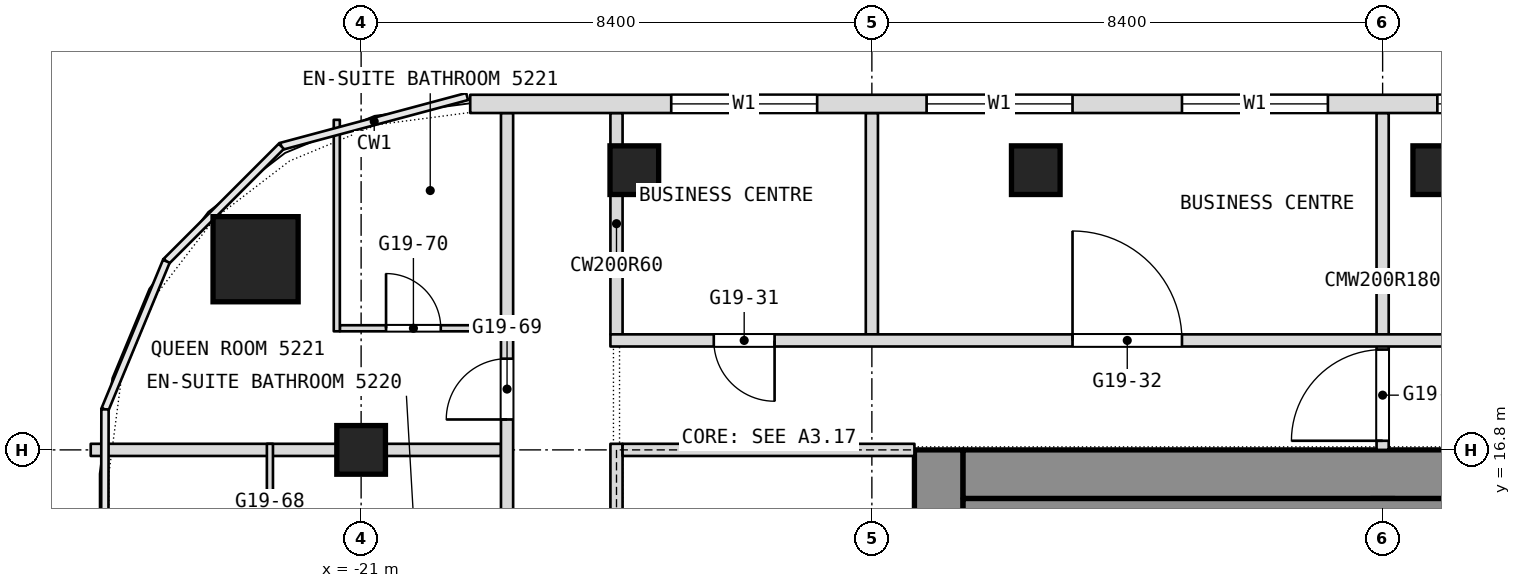
"""IFC4 building model, lengths in metres.
Left out: names, types, materials, properties, quantities, classifications, styles, units other than length and angle.
Written with IfcOpenShell. Run it as: python <this file> out.ifc"""

import sys

from ifc_helpers import new_model, si_unit, direction, frame, frame_2d, origin, origin_2d, place, context, subcontext, project, spatial, rectangle, extrude, element, fill, save


model = new_model("IFC4")
c1 = context("Model", 3, precision=1e-05, world=origin(), true_north=direction((0.0, 1.0)))
c2 = subcontext(c1, "Body", "Model", "MODEL_VIEW")
j1 = project(units=[si_unit("LENGTHUNIT", "METRE"), si_unit("PLANEANGLEUNIT", "RADIAN")], contexts=[c1])
p1 = place(None, origin())
s1 = spatial("IfcSite", under=j1, at=p1, CompositionType="ELEMENT")
p2 = place(p1, origin())
s2 = spatial("IfcBuilding", under=s1, at=p2, CompositionType="ELEMENT")
p3 = place(p2, frame((0.0, 0.0, 223.7)))
s3 = spatial("IfcBuildingStorey", under=s2, at=p3, CompositionType="ELEMENT", Elevation=223.7)
p4 = place(p3, frame((-11.5, 0.0, 0.0), z_axis=(0.0, 0.0, 1.0), x_axis=(0.0, 1.0, 0.0)))
e1 = element("IfcWall", 1, at=p4, inside=s3, PredefinedType="SHEAR", context=c2, shape_type="SweptSolid", body=[
    extrude(rectangle(XDim=16.8, YDim=0.8, at=frame_2d((8.4, 0.0))), origin(), (0.0, 0.0, 1.0), 3.6),
])
p5 = place(p4, frame((1.688, 0.0, 0.0)))
e2 = element("IfcOpeningElement", 2, at=p5, cuts=e1, PredefinedType="OPENING", context=c2, shape_type="SweptSolid", body=[
    extrude(rectangle(XDim=0.9, YDim=2.1, at=frame_2d((0.45, 1.05))), frame((0.0, 0.4, 0.0), z_axis=(0.0, -1.0, 0.0), x_axis=(1.0, 0.0, 0.0)), (0.0, 0.0, 1.0), 0.8),
])
p6 = place(p4, frame((4.312, 0.0, 0.0)))
e3 = element("IfcOpeningElement", 3, at=p6, cuts=e1, PredefinedType="OPENING", context=c2, shape_type="SweptSolid", body=[
    extrude(rectangle(XDim=0.9, YDim=2.1, at=frame_2d((0.45, 1.05))), frame((0.0, 0.4, 0.0), z_axis=(0.0, -1.0, 0.0), x_axis=(1.0, 0.0, 0.0)), (0.0, 0.0, 1.0), 0.8),
])
p7 = place(p4, frame((6.825, 0.0, 0.0)))
e4 = element("IfcOpeningElement", 4, at=p7, cuts=e1, PredefinedType="OPENING", context=c2, shape_type="SweptSolid", body=[
    extrude(rectangle(XDim=1.2, YDim=2.1, at=frame_2d((0.6, 1.05))), frame((0.0, 0.4, 0.0), z_axis=(0.0, -1.0, 0.0), x_axis=(1.0, 0.0, 0.0)), (0.0, 0.0, 1.0), 0.8),
])
p8 = place(p4, frame((12.3, 0.0, 0.0)))
e5 = element("IfcOpeningElement", 5, at=p8, cuts=e1, PredefinedType="OPENING", context=c2, shape_type="SweptSolid", body=[
    extrude(rectangle(XDim=0.9, YDim=2.1, at=frame_2d((0.45, 1.05))), frame((0.0, 0.4, 0.0), z_axis=(0.0, -1.0, 0.0), x_axis=(1.0, 0.0, 0.0)), (0.0, 0.0, 1.0), 0.8),
])
p9 = place(p4, frame((8.775, 0.0, 0.0)))
e6 = element("IfcOpeningElement", 6, at=p9, cuts=e1, PredefinedType="OPENING", context=c2, shape_type="SweptSolid", body=[
    extrude(rectangle(XDim=1.2, YDim=2.1, at=frame_2d((0.6, 1.05))), frame((0.0, 0.4, 0.0), z_axis=(0.0, -1.0, 0.0), x_axis=(1.0, 0.0, 0.0)), (0.0, 0.0, 1.0), 0.8),
])
p10 = place(p3, frame((-11.1, 16.4, 0.0), z_axis=(0.0, 0.0, 1.0), x_axis=(1.0, 0.0, 0.0)))
e7 = element("IfcWall", 7, at=p10, inside=s3, PredefinedType="SHEAR", context=c2, shape_type="SweptSolid", body=[
    extrude(rectangle(XDim=22.2, YDim=0.8, at=frame_2d((11.1, 0.0))), origin(), (0.0, 0.0, 1.0), 3.6),
])
p11 = place(p3, frame((-4.2, 0.8, 0.0), z_axis=(0.0, 0.0, 1.0), x_axis=(0.0, 1.0, 0.0)))
e8 = element("IfcWall", 8, at=p11, inside=s3, PredefinedType="SHEAR", context=c2, shape_type="SweptSolid", body=[
    extrude(rectangle(XDim=15.2, YDim=0.4, at=frame_2d((7.6, 0.0))), origin(), (0.0, 0.0, 1.0), 3.6),
])
p12 = place(p11, frame((8.5, 0.0, 0.0)))
e9 = element("IfcOpeningElement", 9, at=p12, cuts=e8, PredefinedType="OPENING", context=c2, shape_type="SweptSolid", body=[
    extrude(rectangle(XDim=1.2, YDim=2.1, at=frame_2d((0.6, 1.05))), frame((0.0, 0.2, 0.0), z_axis=(0.0, -1.0, 0.0), x_axis=(1.0, 0.0, 0.0)), (0.0, 0.0, 1.0), 0.4),
])
p13 = place(p3, frame((-22.736, 19.936, 0.0), z_axis=(0.0, 0.0, 1.0), x_axis=(1.0, 0.0, 0.0)))
e10 = element("IfcColumn", 10, at=p13, inside=s3, PredefinedType="COLUMN", context=c2, shape_type="SweptSolid", body=[
    extrude(rectangle(XDim=1.4, YDim=1.4, at=origin_2d()), origin(), (0.0, 0.0, 1.0), 3.6),
])
for number, where, z_axis, x_axis in (
    (11, (-21.0, 16.8, 0.0), (0.0, 0.0, 1.0), (1.0, 0.0, 0.0)),
    (12, (-16.507, 21.4, 0.0), (0.0, 0.0, 1.0), (1.0, 0.0, 0.0)),
    (13, (-9.904, 21.4, 0.0), (0.0, 0.0, 1.0), (1.0, 0.0, 0.0)),
    (14, (-3.302, 21.4, 0.0), (0.0, 0.0, 1.0), (1.0, 0.0, 0.0)),
):
    element("IfcColumn", number, at=place(p3, frame(where, z_axis=z_axis, x_axis=x_axis)), inside=s3, PredefinedType="COLUMN", context=c2, shape_type="SweptSolid", body=[
        extrude(rectangle(XDim=0.8, YDim=0.8, at=origin_2d()), origin(), (0.0, 0.0, 1.0), 3.6),
    ])
p14 = place(p3, frame((-4.2, 16.8, 0.0), z_axis=(0.0, 0.0, 1.0), x_axis=(0.0, 1.0, 0.0)))
e15 = element("IfcWall", 15, at=p14, inside=s3, PredefinedType="PARTITIONING", context=c2, shape_type="SweptSolid", body=[
    extrude(rectangle(XDim=5.54, YDim=0.2, at=frame_2d((2.77, 0.0))), origin(), (0.0, 0.0, 1.0), 3.34),
])
p15 = place(p14, frame((0.15, 0.0, 0.0)))
e16 = element("IfcOpeningElement", 16, at=p15, cuts=e15, PredefinedType="OPENING", context=c2, shape_type="SweptSolid", body=[
    extrude(rectangle(XDim=1.5, YDim=2.1, at=frame_2d((0.75, 1.05))), frame((0.0, 0.1, 0.0), z_axis=(0.0, -1.0, 0.0), x_axis=(1.0, 0.0, 0.0)), (0.0, 0.0, 1.0), 0.2),
])
for number, where, z_axis, x_axis in (
    (17, (-12.6, 18.7, 0.0), (0.0, 0.0, 1.0), (0.0, 1.0, 0.0)),
    (18, (-16.8, 18.7, 0.0), (0.0, 0.0, 1.0), (0.0, 1.0, 0.0)),
):
    element("IfcWall", number, at=place(p3, frame(where, z_axis=z_axis, x_axis=x_axis)), inside=s3, PredefinedType="PARTITIONING", context=c2, shape_type="SweptSolid", body=[
        extrude(rectangle(XDim=3.64, YDim=0.2, at=frame_2d((1.82, 0.0))), origin(), (0.0, 0.0, 1.0), 3.34),
    ])
p16 = place(p3, frame((-25.447, 16.8, 0.0), z_axis=(0.0, 0.0, 1.0), x_axis=(1.0, 0.0, 0.0)))
e19 = element("IfcWall", 19, at=p16, inside=s3, PredefinedType="PARTITIONING", context=c2, shape_type="SweptSolid", body=[
    extrude(rectangle(XDim=6.747, YDim=0.2, at=frame_2d((3.374, 0.0))), origin(), (0.0, 0.0, 1.0), 2.94),
])
p17 = place(p3, frame((-18.6, -26.751, 0.0), z_axis=(0.0, 0.0, 1.0), x_axis=(0.0, 1.0, 0.0)))
e20 = element("IfcWall", 20, at=p17, inside=s3, PredefinedType="PARTITIONING", context=c2, shape_type="SweptSolid", body=[
    extrude(rectangle(XDim=49.091, YDim=0.2, at=frame_2d((24.545, 0.0))), origin(), (0.0, 0.0, 1.0), 3.34),
])
p18 = place(p17, frame((3.413, 0.0, 0.0)))
e21 = element("IfcOpeningElement", 21, at=p18, cuts=e20, PredefinedType="OPENING", context=c2, shape_type="SweptSolid", body=[
    extrude(rectangle(XDim=1.0, YDim=2.1, at=frame_2d((0.5, 1.05))), frame((0.0, 0.1, 0.0), z_axis=(0.0, -1.0, 0.0), x_axis=(1.0, 0.0, 0.0)), (0.0, 0.0, 1.0), 0.2),
])
p19 = place(p17, frame((5.838, 0.0, 0.0)))
e22 = element("IfcOpeningElement", 22, at=p19, cuts=e20, PredefinedType="OPENING", context=c2, shape_type="SweptSolid", body=[
    extrude(rectangle(XDim=1.0, YDim=2.1, at=frame_2d((0.5, 1.05))), frame((0.0, 0.1, 0.0), z_axis=(0.0, -1.0, 0.0), x_axis=(1.0, 0.0, 0.0)), (0.0, 0.0, 1.0), 0.2),
])
p20 = place(p17, frame((10.351, 0.0, 0.0)))
e23 = element("IfcOpeningElement", 23, at=p20, cuts=e20, PredefinedType="OPENING", context=c2, shape_type="SweptSolid", body=[
    extrude(rectangle(XDim=1.0, YDim=2.1, at=frame_2d((0.5, 1.05))), frame((0.0, 0.1, 0.0), z_axis=(0.0, -1.0, 0.0), x_axis=(1.0, 0.0, 0.0)), (0.0, 0.0, 1.0), 0.2),
])
p21 = place(p17, frame((16.951, 0.0, 0.0)))
e24 = element("IfcOpeningElement", 24, at=p21, cuts=e20, PredefinedType="OPENING", context=c2, shape_type="SweptSolid", body=[
    extrude(rectangle(XDim=1.0, YDim=2.1, at=frame_2d((0.5, 1.05))), frame((0.0, 0.1, 0.0), z_axis=(0.0, -1.0, 0.0), x_axis=(1.0, 0.0, 0.0)), (0.0, 0.0, 1.0), 0.2),
])
p22 = place(p17, frame((21.151, 0.0, 0.0)))
e25 = element("IfcOpeningElement", 25, at=p22, cuts=e20, PredefinedType="OPENING", context=c2, shape_type="SweptSolid", body=[
    extrude(rectangle(XDim=1.0, YDim=2.1, at=frame_2d((0.5, 1.05))), frame((0.0, 0.1, 0.0), z_axis=(0.0, -1.0, 0.0), x_axis=(1.0, 0.0, 0.0)), (0.0, 0.0, 1.0), 0.2),
])
p23 = place(p17, frame((22.951, 0.0, 0.0)))
e26 = element("IfcOpeningElement", 26, at=p23, cuts=e20, PredefinedType="OPENING", context=c2, shape_type="SweptSolid", body=[
    extrude(rectangle(XDim=1.0, YDim=2.1, at=frame_2d((0.5, 1.05))), frame((0.0, 0.1, 0.0), z_axis=(0.0, -1.0, 0.0), x_axis=(1.0, 0.0, 0.0)), (0.0, 0.0, 1.0), 0.2),
])
p24 = place(p17, frame((30.351, 0.0, 0.0)))
e27 = element("IfcOpeningElement", 27, at=p24, cuts=e20, PredefinedType="OPENING", context=c2, shape_type="SweptSolid", body=[
    extrude(rectangle(XDim=1.1, YDim=2.1, at=frame_2d((0.55, 1.05))), frame((0.0, 0.1, 0.0), z_axis=(0.0, -1.0, 0.0), x_axis=(1.0, 0.0, 0.0)), (0.0, 0.0, 1.0), 0.2),
])
p25 = place(p17, frame((37.951, 0.0, 0.0)))
e28 = element("IfcOpeningElement", 28, at=p25, cuts=e20, PredefinedType="OPENING", context=c2, shape_type="SweptSolid", body=[
    extrude(rectangle(XDim=1.0, YDim=2.1, at=frame_2d((0.5, 1.05))), frame((0.0, 0.1, 0.0), z_axis=(0.0, -1.0, 0.0), x_axis=(1.0, 0.0, 0.0)), (0.0, 0.0, 1.0), 0.2),
])
p26 = place(p17, frame((39.751, 0.0, 0.0)))
e29 = element("IfcOpeningElement", 29, at=p26, cuts=e20, PredefinedType="OPENING", context=c2, shape_type="SweptSolid", body=[
    extrude(rectangle(XDim=1.0, YDim=2.1, at=frame_2d((0.5, 1.05))), frame((0.0, 0.1, 0.0), z_axis=(0.0, -1.0, 0.0), x_axis=(1.0, 0.0, 0.0)), (0.0, 0.0, 1.0), 0.2),
])
p27 = place(p17, frame((44.051, 0.0, 0.0)))
e30 = element("IfcOpeningElement", 30, at=p27, cuts=e20, PredefinedType="OPENING", context=c2, shape_type="SweptSolid", body=[
    extrude(rectangle(XDim=1.0, YDim=2.1, at=frame_2d((0.5, 1.05))), frame((0.0, 0.1, 0.0), z_axis=(0.0, -1.0, 0.0), x_axis=(1.0, 0.0, 0.0)), (0.0, 0.0, 1.0), 0.2),
])
p28 = place(p3, frame((-16.9, 18.6, 0.0), z_axis=(0.0, 0.0, 1.0), x_axis=(1.0, 0.0, 0.0)))
e31 = element("IfcWall", 31, at=p28, inside=s3, PredefinedType="PARTITIONING", context=c2, shape_type="SweptSolid", body=[
    extrude(rectangle(XDim=33.8, YDim=0.2, at=frame_2d((16.9, 0.0))), origin(), (0.0, 0.0, 1.0), 3.34),
])
p29 = place(p28, frame((1.7, 0.0, 0.0)))
e32 = element("IfcOpeningElement", 32, at=p29, cuts=e31, PredefinedType="OPENING", context=c2, shape_type="SweptSolid", body=[
    extrude(rectangle(XDim=1.0, YDim=2.1, at=frame_2d((0.5, 1.05))), frame((0.0, 0.1, 0.0), z_axis=(0.0, -1.0, 0.0), x_axis=(1.0, 0.0, 0.0)), (0.0, 0.0, 1.0), 0.2),
])
p30 = place(p28, frame((7.6, 0.0, 0.0)))
e33 = element("IfcOpeningElement", 33, at=p30, cuts=e31, PredefinedType="OPENING", context=c2, shape_type="SweptSolid", body=[
    extrude(rectangle(XDim=1.8, YDim=2.1, at=frame_2d((0.9, 1.05))), frame((0.0, 0.1, 0.0), z_axis=(0.0, -1.0, 0.0), x_axis=(1.0, 0.0, 0.0)), (0.0, 0.0, 1.0), 0.2),
])
p31 = place(p28, frame((16.0, 0.0, 0.0)))
e34 = element("IfcOpeningElement", 34, at=p31, cuts=e31, PredefinedType="OPENING", context=c2, shape_type="SweptSolid", body=[
    extrude(rectangle(XDim=1.8, YDim=2.1, at=frame_2d((0.9, 1.05))), frame((0.0, 0.1, 0.0), z_axis=(0.0, -1.0, 0.0), x_axis=(1.0, 0.0, 0.0)), (0.0, 0.0, 1.0), 0.2),
])
p32 = place(p28, frame((24.4, 0.0, 0.0)))
e35 = element("IfcOpeningElement", 35, at=p32, cuts=e31, PredefinedType="OPENING", context=c2, shape_type="SweptSolid", body=[
    extrude(rectangle(XDim=1.8, YDim=2.1, at=frame_2d((0.9, 1.05))), frame((0.0, 0.1, 0.0), z_axis=(0.0, -1.0, 0.0), x_axis=(1.0, 0.0, 0.0)), (0.0, 0.0, 1.0), 0.2),
])
p33 = place(p28, frame((31.1, 0.0, 0.0)))
e36 = element("IfcOpeningElement", 36, at=p33, cuts=e31, PredefinedType="OPENING", context=c2, shape_type="SweptSolid", body=[
    extrude(rectangle(XDim=1.0, YDim=2.1, at=frame_2d((0.5, 1.05))), frame((0.0, 0.1, 0.0), z_axis=(0.0, -1.0, 0.0), x_axis=(1.0, 0.0, 0.0)), (0.0, 0.0, 1.0), 0.2),
])
p34 = place(p3, frame((-21.35, 18.8, 0.0), z_axis=(0.0, 0.0, 1.0), x_axis=(1.0, 0.0, 0.0)))
e37 = element("IfcWall", 37, at=p34, inside=s3, PredefinedType="PARTITIONING", context=c2, shape_type="SweptSolid", body=[
    extrude(rectangle(XDim=2.65, YDim=0.1, at=frame_2d((1.325, 0.0))), origin(), (0.0, 0.0, 1.0), 3.34),
])
p35 = place(p34, frame((0.76, 0.0, 0.0)))
e38 = element("IfcOpeningElement", 38, at=p35, cuts=e37, PredefinedType="OPENING", context=c2, shape_type="SweptSolid", body=[
    extrude(rectangle(XDim=0.9, YDim=2.1, at=frame_2d((0.45, 1.05))), frame((0.0, 0.05, 0.0), z_axis=(0.0, -1.0, 0.0), x_axis=(1.0, 0.0, 0.0)), (0.0, 0.0, 1.0), 0.1),
])
p36 = place(p3, frame((-21.4, 18.75, 0.0), z_axis=(0.0, 0.0, 1.0), x_axis=(0.0, 1.0, 0.0)))
e39 = element("IfcWall", 39, at=p36, inside=s3, PredefinedType="PARTITIONING", context=c2, shape_type="SweptSolid", body=[
    extrude(rectangle(XDim=3.478, YDim=0.1, at=frame_2d((1.739, 0.0))), origin(), (0.0, 0.0, 1.0), 3.34),
])
p37 = place(p3, frame((-22.5, 14.35, 0.0), z_axis=(0.0, 0.0, 1.0), x_axis=(0.0, 1.0, 0.0)))
e40 = element("IfcWall", 40, at=p37, inside=s3, PredefinedType="PARTITIONING", context=c2, shape_type="SweptSolid", body=[
    extrude(rectangle(XDim=2.55, YDim=0.1, at=frame_2d((1.275, 0.0))), origin(), (0.0, 0.0, 1.0), 3.34),
])
p38 = place(p37, frame((0.15, 0.0, 0.0)))
e41 = element("IfcOpeningElement", 41, at=p38, cuts=e40, PredefinedType="OPENING", context=c2, shape_type="SweptSolid", body=[
    extrude(rectangle(XDim=0.9, YDim=2.1, at=frame_2d((0.45, 1.05))), frame((0.0, 0.05, 0.0), z_axis=(0.0, -1.0, 0.0), x_axis=(1.0, 0.0, 0.0)), (0.0, 0.0, 1.0), 0.1),
])
p39 = place(p3, frame((19.206, 22.49, 0.0), z_axis=(0.0, 0.0, 1.0), x_axis=(-1.0, 0.0, 0.0)))
e42 = element("IfcWall", 42, at=p39, inside=s3, PredefinedType="NOTDEFINED", context=c2, shape_type="SweptSolid", body=[
    extrude(rectangle(XDim=38.412, YDim=0.3, at=frame_2d((19.206, 0.0))), origin(), (0.0, 0.0, 1.0), 3.6),
])
p40 = place(p39, frame((3.306, 0.0, 0.9)))
e43 = element("IfcOpeningElement", 43, at=p40, cuts=e42, PredefinedType="OPENING", context=c2, shape_type="SweptSolid", body=[
    extrude(rectangle(XDim=2.4, YDim=2.1, at=frame_2d((1.2, 1.05))), frame((0.0, 0.15, 0.0), z_axis=(0.0, -1.0, 0.0), x_axis=(1.0, 0.0, 0.0)), (0.0, 0.0, 1.0), 0.3),
])
p41 = place(p39, frame((7.506, 0.0, 0.9)))
e44 = element("IfcOpeningElement", 44, at=p41, cuts=e42, PredefinedType="OPENING", context=c2, shape_type="SweptSolid", body=[
    extrude(rectangle(XDim=2.4, YDim=2.1, at=frame_2d((1.2, 1.05))), frame((0.0, 0.15, 0.0), z_axis=(0.0, -1.0, 0.0), x_axis=(1.0, 0.0, 0.0)), (0.0, 0.0, 1.0), 0.3),
])
p42 = place(p39, frame((11.706, 0.0, 0.9)))
e45 = element("IfcOpeningElement", 45, at=p42, cuts=e42, PredefinedType="OPENING", context=c2, shape_type="SweptSolid", body=[
    extrude(rectangle(XDim=2.4, YDim=2.1, at=frame_2d((1.2, 1.05))), frame((0.0, 0.15, 0.0), z_axis=(0.0, -1.0, 0.0), x_axis=(1.0, 0.0, 0.0)), (0.0, 0.0, 1.0), 0.3),
])
p43 = place(p39, frame((15.906, 0.0, 0.9)))
e46 = element("IfcOpeningElement", 46, at=p43, cuts=e42, PredefinedType="OPENING", context=c2, shape_type="SweptSolid", body=[
    extrude(rectangle(XDim=2.4, YDim=2.1, at=frame_2d((1.2, 1.05))), frame((0.0, 0.15, 0.0), z_axis=(0.0, -1.0, 0.0), x_axis=(1.0, 0.0, 0.0)), (0.0, 0.0, 1.0), 0.3),
])
p44 = place(p39, frame((20.106, 0.0, 0.9)))
e47 = element("IfcOpeningElement", 47, at=p44, cuts=e42, PredefinedType="OPENING", context=c2, shape_type="SweptSolid", body=[
    extrude(rectangle(XDim=2.4, YDim=2.1, at=frame_2d((1.2, 1.05))), frame((0.0, 0.15, 0.0), z_axis=(0.0, -1.0, 0.0), x_axis=(1.0, 0.0, 0.0)), (0.0, 0.0, 1.0), 0.3),
])
p45 = place(p39, frame((24.306, 0.0, 0.9)))
e48 = element("IfcOpeningElement", 48, at=p45, cuts=e42, PredefinedType="OPENING", context=c2, shape_type="SweptSolid", body=[
    extrude(rectangle(XDim=2.4, YDim=2.1, at=frame_2d((1.2, 1.05))), frame((0.0, 0.15, 0.0), z_axis=(0.0, -1.0, 0.0), x_axis=(1.0, 0.0, 0.0)), (0.0, 0.0, 1.0), 0.3),
])
p46 = place(p39, frame((28.506, 0.0, 0.9)))
e49 = element("IfcOpeningElement", 49, at=p46, cuts=e42, PredefinedType="OPENING", context=c2, shape_type="SweptSolid", body=[
    extrude(rectangle(XDim=2.4, YDim=2.1, at=frame_2d((1.2, 1.05))), frame((0.0, 0.15, 0.0), z_axis=(0.0, -1.0, 0.0), x_axis=(1.0, 0.0, 0.0)), (0.0, 0.0, 1.0), 0.3),
])
p47 = place(p39, frame((32.706, 0.0, 0.9)))
e50 = element("IfcOpeningElement", 50, at=p47, cuts=e42, PredefinedType="OPENING", context=c2, shape_type="SweptSolid", body=[
    extrude(rectangle(XDim=2.4, YDim=2.1, at=frame_2d((1.2, 1.05))), frame((0.0, 0.15, 0.0), z_axis=(0.0, -1.0, 0.0), x_axis=(1.0, 0.0, 0.0)), (0.0, 0.0, 1.0), 0.3),
])
p48 = place(p3, frame((-11.1, 15.65, 0.0), z_axis=(0.0, 0.0, 1.0), x_axis=(1.0, 0.0, 0.0)))
e51 = element("IfcWall", 51, at=p48, inside=s3, PredefinedType="PARTITIONING", context=c2, shape_type="SweptSolid", body=[
    extrude(rectangle(XDim=22.2, YDim=0.7, at=frame_2d((11.1, 0.0))), origin(), (0.0, 0.0, 1.0), 3.34),
])
p49 = place(p3, frame((-16.8, -0.1, 0.0), z_axis=(0.0, 0.0, 1.0), x_axis=(0.0, 1.0, 0.0)))
e52 = element("IfcWall", 52, at=p49, inside=s3, PredefinedType="PARTITIONING", context=c2, shape_type="SweptSolid", body=[
    extrude(rectangle(XDim=17.0, YDim=0.2, at=frame_2d((8.5, 0.0))), origin(), (0.0, 0.0, 1.0), 3.34),
])
p50 = place(p49, frame((2.2, 0.0, 0.0)))
e53 = element("IfcOpeningElement", 53, at=p50, cuts=e52, PredefinedType="OPENING", context=c2, shape_type="SweptSolid", body=[
    extrude(rectangle(XDim=1.8, YDim=2.1, at=frame_2d((0.9, 1.05))), frame((0.0, 0.1, 0.0), z_axis=(0.0, -1.0, 0.0), x_axis=(1.0, 0.0, 0.0)), (0.0, 0.0, 1.0), 0.2),
])
p51 = place(p49, frame((13.0, 0.0, 0.0)))
e54 = element("IfcOpeningElement", 54, at=p51, cuts=e52, PredefinedType="OPENING", context=c2, shape_type="SweptSolid", body=[
    extrude(rectangle(XDim=1.8, YDim=2.1, at=frame_2d((0.9, 1.05))), frame((0.0, 0.1, 0.0), z_axis=(0.0, -1.0, 0.0), x_axis=(1.0, 0.0, 0.0)), (0.0, 0.0, 1.0), 0.2),
])
p52 = place(p3, frame((-16.7, 16.8, 0.0), z_axis=(0.0, 0.0, 1.0), x_axis=(1.0, 0.0, 0.0)))
e55 = element("IfcWall", 55, at=p52, inside=s3, PredefinedType="PARTITIONING", context=c2, shape_type="SweptSolid", body=[
    extrude(rectangle(XDim=4.8, YDim=0.2, at=frame_2d((2.4, 0.0))), origin(), (0.0, 0.0, 1.0), 2.94),
])
p53 = place(p27, origin())
e56 = element("IfcDoor", 56, at=p53, inside=s3, OperationType="SINGLE_SWING_RIGHT", PredefinedType="DOOR", context=c2, shape_type="SweptSolid", body=[
    extrude(rectangle(XDim=1.0, YDim=2.1, at=frame_2d((0.5, 1.05))), frame((0.0, 0.025, 0.0), z_axis=(0.0, -1.0, 0.0), x_axis=(1.0, 0.0, 0.0)), (0.0, 0.0, 1.0), 0.05),
])
fill(e30, e56)
p54 = place(p29, origin())
e57 = element("IfcDoor", 57, at=p54, inside=s3, OperationType="SINGLE_SWING_LEFT", PredefinedType="DOOR", context=c2, shape_type="SweptSolid", body=[
    extrude(rectangle(XDim=1.0, YDim=2.1, at=frame_2d((0.5, 1.05))), frame((0.0, 0.025, 0.0), z_axis=(0.0, -1.0, 0.0), x_axis=(1.0, 0.0, 0.0)), (0.0, 0.0, 1.0), 0.05),
])
fill(e32, e57)
p55 = place(p30, origin())
e58 = element("IfcDoor", 58, at=p55, inside=s3, OperationType="DOUBLE_DOOR_SINGLE_SWING", PredefinedType="DOOR", context=c2, shape_type="SweptSolid", body=[
    extrude(rectangle(XDim=1.8, YDim=2.1, at=frame_2d((0.9, 1.05))), frame((0.0, 0.025, 0.0), z_axis=(0.0, -1.0, 0.0), x_axis=(1.0, 0.0, 0.0)), (0.0, 0.0, 1.0), 0.05),
])
fill(e33, e58)
p56 = place(p35, origin())
e59 = element("IfcDoor", 59, at=p56, inside=s3, OperationType="SINGLE_SWING_LEFT", PredefinedType="DOOR", context=c2, shape_type="SweptSolid", body=[
    extrude(rectangle(XDim=0.9, YDim=2.1, at=frame_2d((0.45, 1.05))), frame((0.0, 0.025, 0.0), z_axis=(0.0, -1.0, 0.0), x_axis=(1.0, 0.0, 0.0)), (0.0, 0.0, 1.0), 0.05),
])
fill(e38, e59)
p57 = place(p44, origin())
e60 = element("IfcWindow", 60, at=p57, inside=s3, PartitioningType="SINGLE_PANEL", PredefinedType="WINDOW", context=c2, shape_type="SweptSolid", body=[
    extrude(rectangle(XDim=2.4, YDim=2.1, at=frame_2d((1.2, 1.05))), frame((0.0, 0.03, 0.0), z_axis=(0.0, -1.0, 0.0), x_axis=(1.0, 0.0, 0.0)), (0.0, 0.0, 1.0), 0.06),
])
fill(e47, e60)
p58 = place(p45, origin())
e61 = element("IfcWindow", 61, at=p58, inside=s3, PartitioningType="SINGLE_PANEL", PredefinedType="WINDOW", context=c2, shape_type="SweptSolid", body=[
    extrude(rectangle(XDim=2.4, YDim=2.1, at=frame_2d((1.2, 1.05))), frame((0.0, 0.03, 0.0), z_axis=(0.0, -1.0, 0.0), x_axis=(1.0, 0.0, 0.0)), (0.0, 0.0, 1.0), 0.06),
])
fill(e48, e61)
p59 = place(p46, origin())
e62 = element("IfcWindow", 62, at=p59, inside=s3, PartitioningType="SINGLE_PANEL", PredefinedType="WINDOW", context=c2, shape_type="SweptSolid", body=[
    extrude(rectangle(XDim=2.4, YDim=2.1, at=frame_2d((1.2, 1.05))), frame((0.0, 0.03, 0.0), z_axis=(0.0, -1.0, 0.0), x_axis=(1.0, 0.0, 0.0)), (0.0, 0.0, 1.0), 0.06),
])
fill(e49, e62)
p60 = place(p47, origin())
e63 = element("IfcWindow", 63, at=p60, inside=s3, PartitioningType="SINGLE_PANEL", PredefinedType="WINDOW", context=c2, shape_type="SweptSolid", body=[
    extrude(rectangle(XDim=2.4, YDim=2.1, at=frame_2d((1.2, 1.05))), frame((0.0, 0.03, 0.0), z_axis=(0.0, -1.0, 0.0), x_axis=(1.0, 0.0, 0.0)), (0.0, 0.0, 1.0), 0.06),
])
fill(e50, e63)
p61 = place(p15, origin())
e64 = element("IfcDoor", 64, at=p61, inside=s3, OperationType="DOUBLE_DOOR_DOUBLE_SWING", PredefinedType="DOOR", context=c2, shape_type="SweptSolid", body=[
    extrude(rectangle(XDim=1.5, YDim=2.1, at=frame_2d((0.75, 1.05))), frame((0.0, 0.025, 0.0), z_axis=(0.0, -1.0, 0.0), x_axis=(1.0, 0.0, 0.0)), (0.0, 0.0, 1.0), 0.05),
])
fill(e16, e64)
save(model, sys.argv[1])
